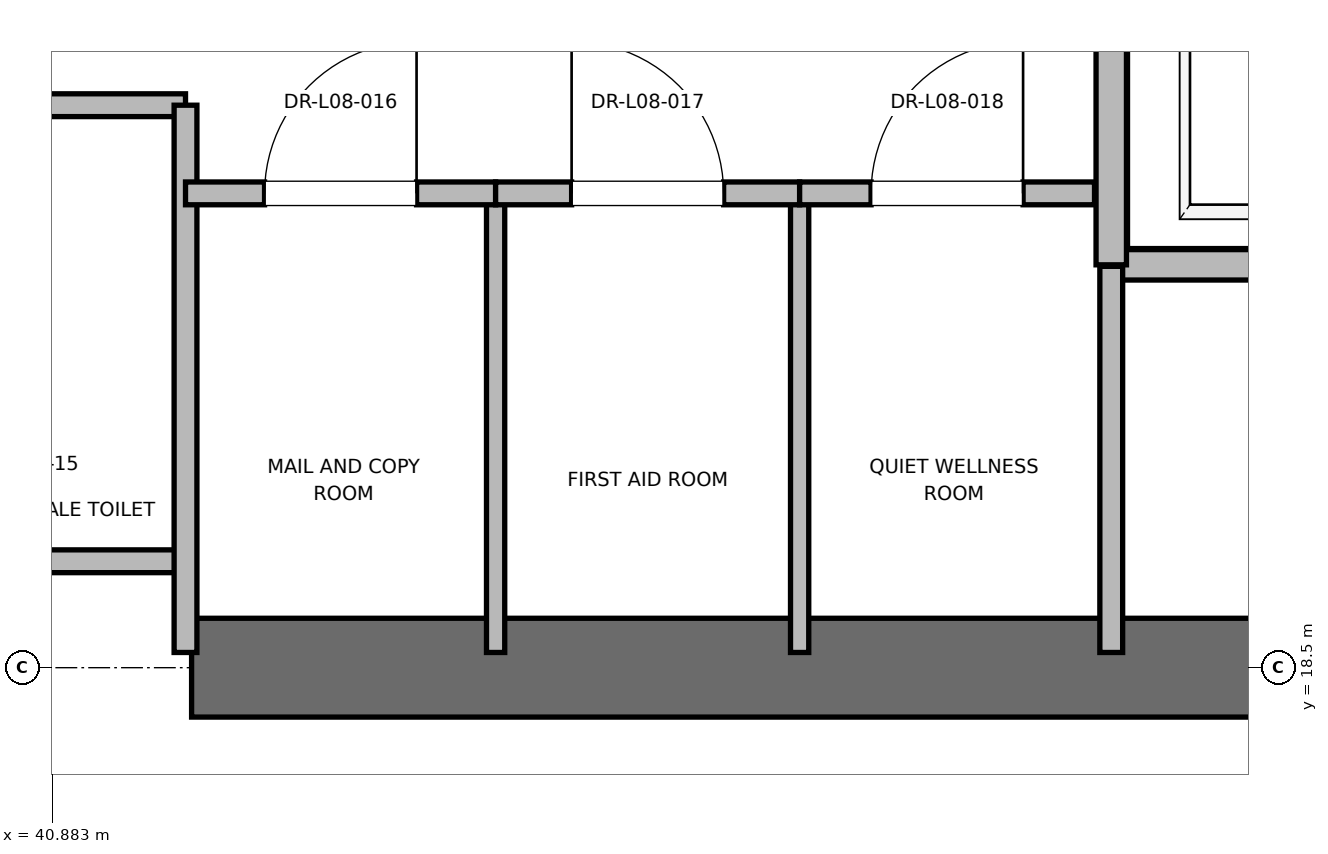
"""IFC4 building model, lengths in metres.
Left out: names, types, materials, properties, quantities, classifications, styles, units other than length and angle.
Written with IfcOpenShell. Run it as: python <this file> out.ifc"""

import sys

from ifc_helpers import new_model, si_unit, direction, frame, frame_2d, origin, place, context, subcontext, project, spatial, rectangle, extrude, element, fill, save


model = new_model("IFC4")
c1 = context("Model", 3, precision=1e-05, world=origin(), true_north=direction((0.0, 1.0)))
c2 = subcontext(c1, "Body", "Model", "MODEL_VIEW")
j1 = project(units=[si_unit("LENGTHUNIT", "METRE"), si_unit("PLANEANGLEUNIT", "RADIAN")], contexts=[c1])
p1 = place(None, origin())
s1 = spatial("IfcSite", under=j1, at=p1, CompositionType="ELEMENT")
p2 = place(p1, origin())
s2 = spatial("IfcBuilding", under=s1, at=p2, CompositionType="ELEMENT")
p3 = place(p2, frame((0.0, 0.0, 39.6)))
s3 = spatial("IfcBuildingStorey", under=s2, at=p3, CompositionType="ELEMENT", Elevation=39.6)
p4 = place(p3, frame((41.8, 18.5, 0.0), z_axis=(0.0, 0.0, 1.0), x_axis=(1.0, 0.0, 0.0)))
e1 = element("IfcWall", 1, at=p4, inside=s3, PredefinedType="SHEAR", context=c2, shape_type="SweptSolid", body=[
    extrude(rectangle(XDim=9.2, YDim=0.65, at=frame_2d((4.6, 0.0))), origin(), (0.0, 0.0, 1.0), 3.76),
])
p5 = place(p3, frame((47.85, 21.15, 0.0), z_axis=(0.0, 0.0, 1.0), x_axis=(1.0, 0.0, 0.0)))
e2 = element("IfcWall", 2, at=p5, inside=s3, PredefinedType="SOLIDWALL", context=c2, shape_type="SweptSolid", body=[
    extrude(rectangle(XDim=2.6, YDim=0.2, at=frame_2d((1.3, 0.0))), origin(), (0.0, 0.0, 1.0), 3.76),
])
p6 = place(p3, frame((47.85, 24.15, 0.0), z_axis=(0.0, 0.0, 1.0), x_axis=(0.0, -1.0, 0.0)))
e3 = element("IfcWall", 3, at=p6, inside=s3, PredefinedType="SOLIDWALL", context=c2, shape_type="SweptSolid", body=[
    extrude(rectangle(XDim=3.0, YDim=0.2, at=frame_2d((1.5, 0.0))), origin(), (0.0, 0.0, 1.0), 3.76),
])
for number, where, z_axis, x_axis in (
    (4, (39.95, 19.2, 0.0), (0.0, 0.0, 1.0), (1.0, 0.0, 0.0)),
    (5, (39.95, 22.2, 0.0), (0.0, 0.0, 1.0), (1.0, 0.0, 0.0)),
):
    element("IfcWall", number, at=place(p3, frame(where, z_axis=z_axis, x_axis=x_axis)), inside=s3, PredefinedType="PARTITIONING", context=c2, shape_type="SweptSolid", body=[
        extrude(rectangle(XDim=1.81, YDim=0.15, at=frame_2d((0.905, 0.0))), origin(), (0.0, 0.0, 1.0), 2.85),
    ])
p7 = place(p3, frame((41.76, 18.6, 0.0), z_axis=(0.0, 0.0, 1.0), x_axis=(0.0, 1.0, 0.0)))
e6 = element("IfcWall", 6, at=p7, inside=s3, PredefinedType="PARTITIONING", context=c2, shape_type="SweptSolid", body=[
    extrude(rectangle(XDim=3.6, YDim=0.15, at=frame_2d((1.8, 0.0))), origin(), (0.0, 0.0, 1.0), 2.54),
])
p8 = place(p3, frame((47.85, 18.6, 0.0), z_axis=(0.0, 0.0, 1.0), x_axis=(0.0, 1.0, 0.0)))
e7 = element("IfcWall", 7, at=p8, inside=s3, PredefinedType="PARTITIONING", context=c2, shape_type="SweptSolid", body=[
    extrude(rectangle(XDim=2.54, YDim=0.15, at=frame_2d((1.27, 0.0))), origin(), (0.0, 0.0, 1.0), 2.85),
])
for number, where, z_axis, x_axis in (
    (8, (43.8, 18.6, 0.0), (0.0, 0.0, 1.0), (0.0, 1.0, 0.0)),
    (9, (45.8, 18.6, 0.0), (0.0, 0.0, 1.0), (0.0, 1.0, 0.0)),
):
    element("IfcWall", number, at=place(p3, frame(where, z_axis=z_axis, x_axis=x_axis)), inside=s3, PredefinedType="PARTITIONING", context=c2, shape_type="SweptSolid", body=[
        extrude(rectangle(XDim=3.02, YDim=0.12, at=frame_2d((1.51, 0.0))), origin(), (0.0, 0.0, 1.0), 2.85),
    ])
p9 = place(p3, frame((41.76, 21.62, 0.0), z_axis=(0.0, 0.0, 1.0), x_axis=(1.0, 0.0, 0.0)))
e10 = element("IfcWall", 10, at=p9, inside=s3, PredefinedType="PARTITIONING", context=c2, shape_type="SweptSolid", body=[
    extrude(rectangle(XDim=2.04, YDim=0.15, at=frame_2d((1.02, 0.0))), origin(), (0.0, 0.0, 1.0), 2.85),
])
p10 = place(p9, frame((0.52, 0.0, 0.0)))
e11 = element("IfcOpeningElement", 11, at=p10, cuts=e10, PredefinedType="OPENING", context=c2, shape_type="SweptSolid", body=[
    extrude(rectangle(XDim=1.0, YDim=2.15, at=frame_2d((0.5, 1.075))), frame((0.0, 0.075, 0.0), z_axis=(0.0, -1.0, 0.0), x_axis=(1.0, 0.0, 0.0)), (0.0, 0.0, 1.0), 0.15),
])
p11 = place(p3, frame((43.8, 21.62, 0.0), z_axis=(0.0, 0.0, 1.0), x_axis=(1.0, 0.0, 0.0)))
e12 = element("IfcWall", 12, at=p11, inside=s3, PredefinedType="PARTITIONING", context=c2, shape_type="SweptSolid", body=[
    extrude(rectangle(XDim=2.0, YDim=0.15, at=frame_2d((1.0, 0.0))), origin(), (0.0, 0.0, 1.0), 2.85),
])
p12 = place(p11, frame((0.5, 0.0, 0.0)))
e13 = element("IfcOpeningElement", 13, at=p12, cuts=e12, PredefinedType="OPENING", context=c2, shape_type="SweptSolid", body=[
    extrude(rectangle(XDim=1.0, YDim=2.15, at=frame_2d((0.5, 1.075))), frame((0.0, 0.075, 0.0), z_axis=(0.0, -1.0, 0.0), x_axis=(1.0, 0.0, 0.0)), (0.0, 0.0, 1.0), 0.15),
])
p13 = place(p3, frame((45.8, 21.62, 0.0), z_axis=(0.0, 0.0, 1.0), x_axis=(1.0, 0.0, 0.0)))
e14 = element("IfcWall", 14, at=p13, inside=s3, PredefinedType="PARTITIONING", context=c2, shape_type="SweptSolid", body=[
    extrude(rectangle(XDim=1.94, YDim=0.15, at=frame_2d((0.97, 0.0))), origin(), (0.0, 0.0, 1.0), 2.85),
])
p14 = place(p13, frame((0.47, 0.0, 0.0)))
e15 = element("IfcOpeningElement", 15, at=p14, cuts=e14, PredefinedType="OPENING", context=c2, shape_type="SweptSolid", body=[
    extrude(rectangle(XDim=1.0, YDim=2.15, at=frame_2d((0.5, 1.075))), frame((0.0, 0.075, 0.0), z_axis=(0.0, -1.0, 0.0), x_axis=(1.0, 0.0, 0.0)), (0.0, 0.0, 1.0), 0.15),
])
p15 = place(p10, origin())
e16 = element("IfcDoor", 16, at=p15, inside=s3, OperationType="SINGLE_SWING_RIGHT", PredefinedType="DOOR", context=c2, shape_type="SweptSolid", body=[
    extrude(rectangle(XDim=1.0, YDim=2.15, at=frame_2d((0.5, 1.075))), frame((0.0, 0.025, 0.0), z_axis=(0.0, -1.0, 0.0), x_axis=(1.0, 0.0, 0.0)), (0.0, 0.0, 1.0), 0.05),
])
fill(e11, e16)
p16 = place(p12, origin())
e17 = element("IfcDoor", 17, at=p16, inside=s3, OperationType="SINGLE_SWING_LEFT", PredefinedType="DOOR", context=c2, shape_type="SweptSolid", body=[
    extrude(rectangle(XDim=1.0, YDim=2.15, at=frame_2d((0.5, 1.075))), frame((0.0, 0.025, 0.0), z_axis=(0.0, -1.0, 0.0), x_axis=(1.0, 0.0, 0.0)), (0.0, 0.0, 1.0), 0.05),
])
fill(e13, e17)
p17 = place(p14, origin())
e18 = element("IfcDoor", 18, at=p17, inside=s3, OperationType="SINGLE_SWING_RIGHT", PredefinedType="DOOR", context=c2, shape_type="SweptSolid", body=[
    extrude(rectangle(XDim=1.0, YDim=2.15, at=frame_2d((0.5, 1.075))), frame((0.0, 0.025, 0.0), z_axis=(0.0, -1.0, 0.0), x_axis=(1.0, 0.0, 0.0)), (0.0, 0.0, 1.0), 0.05),
])
fill(e15, e18)
save(model, sys.argv[1])
